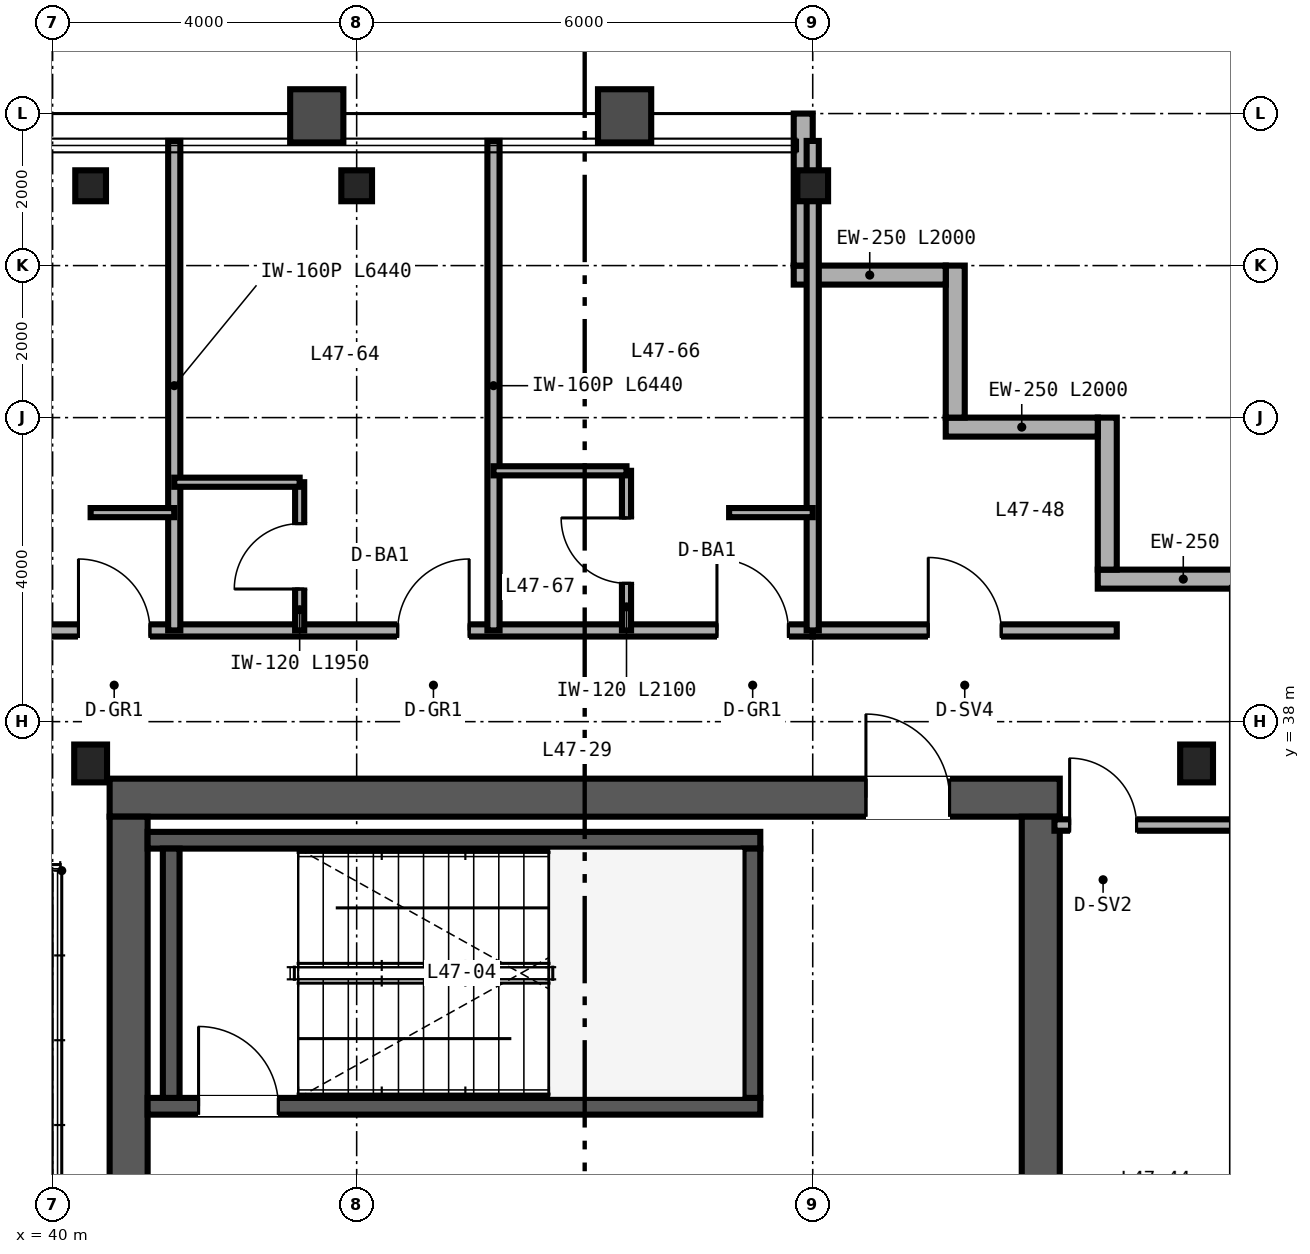
"""IFC4 building model, lengths in metres.
Left out: names, types, materials, properties, quantities, classifications, styles, units other than length and angle.
Written with IfcOpenShell. Run it as: python <this file> out.ifc"""

import sys

from ifc_helpers import new_model, si_unit, direction, frame, frame_2d, origin, origin_2d, place, context, subcontext, project, spatial, rectangle, i_section, extrude, source, transform, mapped, element, fill, save


model = new_model("IFC4")
c1 = context("Model", 3, precision=1e-05, world=origin(), true_north=direction((0.0, 1.0)))
c2 = subcontext(c1, "Body", "Model", "MODEL_VIEW")
j1 = project(units=[si_unit("LENGTHUNIT", "METRE"), si_unit("PLANEANGLEUNIT", "RADIAN")], contexts=[c1])
p1 = place(None, origin())
s1 = spatial("IfcSite", under=j1, at=p1, CompositionType="ELEMENT")
p2 = place(p1, origin())
s2 = spatial("IfcBuilding", under=s1, at=p2, CompositionType="ELEMENT")
p3 = place(p2, frame((0.0, 0.0, 188.4)))
s3 = spatial("IfcBuildingStorey", under=s2, at=p3, CompositionType="ELEMENT", Elevation=188.4)
p4 = place(p3, frame((40.75, 37.0, 0.0), z_axis=(0.0, 0.0, 1.0), x_axis=(1.0, 0.0, 0.0)))
e1 = element("IfcWall", 1, at=p4, inside=s3, PredefinedType="SHEAR", context=c2, shape_type="SweptSolid", body=[
    extrude(rectangle(XDim=12.5, YDim=0.5, at=frame_2d((6.25, 0.0))), origin(), (0.0, 0.0, 1.0), 3.37),
])
p5 = place(p4, frame((9.95, 0.0, 0.0)))
e2 = element("IfcOpeningElement", 2, at=p5, cuts=e1, PredefinedType="OPENING", context=c2, shape_type="SweptSolid", body=[
    extrude(rectangle(XDim=1.1, YDim=2.15, at=frame_2d((0.55, 1.075))), frame((0.0, 0.26, 0.0), z_axis=(0.0, -1.0, 0.0), x_axis=(1.0, 0.0, 0.0)), (0.0, 0.0, 1.0), 0.52),
])
for number, where, z_axis, x_axis in (
    (3, (41.0, 15.25, 0.0), (0.0, 0.0, 1.0), (0.0, 1.0, 0.0)),
    (4, (53.0, 15.25, 0.0), (0.0, 0.0, 1.0), (0.0, 1.0, 0.0)),
):
    element("IfcWall", number, at=place(p3, frame(where, z_axis=z_axis, x_axis=x_axis)), inside=s3, PredefinedType="SHEAR", context=c2, shape_type="SweptSolid", body=[
        extrude(rectangle(XDim=21.5, YDim=0.5, at=frame_2d((10.75, 0.0))), origin(), (0.0, 0.0, 1.0), 3.37),
    ])
p6 = place(p3, frame((41.25, 32.94, 0.0), z_axis=(0.0, 0.0, 1.0), x_axis=(1.0, 0.0, 0.0)))
e5 = element("IfcWall", 5, at=p6, inside=s3, PredefinedType="SHEAR", context=c2, shape_type="SweptSolid", body=[
    extrude(rectangle(XDim=8.06, YDim=0.22, at=frame_2d((4.03, 0.0))), origin(), (0.0, 0.0, 1.0), 3.4),
])
p7 = place(p6, frame((0.67, 0.0, 0.0)))
e6 = element("IfcOpeningElement", 6, at=p7, cuts=e5, PredefinedType="OPENING", context=c2, shape_type="SweptSolid", body=[
    extrude(rectangle(XDim=1.05, YDim=2.15, at=frame_2d((0.525, 1.075))), frame((0.0, 0.12, 0.0), z_axis=(0.0, -1.0, 0.0), x_axis=(1.0, 0.0, 0.0)), (0.0, 0.0, 1.0), 0.24),
])
p8 = place(p3, frame((41.25, 36.44, 0.0), z_axis=(0.0, 0.0, 1.0), x_axis=(1.0, 0.0, 0.0)))
e7 = element("IfcWall", 7, at=p8, inside=s3, PredefinedType="SHEAR", context=c2, shape_type="SweptSolid", body=[
    extrude(rectangle(XDim=8.06, YDim=0.22, at=frame_2d((4.03, 0.0))), origin(), (0.0, 0.0, 1.0), 3.4),
])
for number, where, z_axis, x_axis in (
    (8, (41.56, 33.05, 0.0), (0.0, 0.0, 1.0), (0.0, 1.0, 0.0)),
    (9, (49.2, 33.05, 0.0), (0.0, 0.0, 1.0), (0.0, 1.0, 0.0)),
):
    element("IfcWall", number, at=place(p3, frame(where, z_axis=z_axis, x_axis=x_axis)), inside=s3, PredefinedType="SHEAR", context=c2, shape_type="SweptSolid", body=[
        extrude(rectangle(XDim=3.28, YDim=0.22, at=frame_2d((1.64, 0.0))), origin(), (0.0, 0.0, 1.0), 3.4),
    ])
m1 = source(origin(), c2, "Body", "SweptSolid", [
    extrude(i_section(OverallWidth=0.432, OverallDepth=0.498, WebThickness=0.056, FlangeThickness=0.089, FilletRadius=0.025, at=origin_2d()), origin(), (0.0, 0.0, 1.0), 3.37),
])
for number, where, z_axis, x_axis in (
    (10, (40.5, 37.45, 0.0), (0.0, 0.0, 1.0), (1.0, 0.0, 0.0)),
    (11, (55.05, 37.45, 0.0), (0.0, 0.0, 1.0), (1.0, 0.0, 0.0)),
):
    element("IfcColumn", number, at=place(p3, frame(where, z_axis=z_axis, x_axis=x_axis)), inside=s3, PredefinedType="COLUMN", context=c2, shape_type="MappedRepresentation", body=[
        mapped(m1, transform((0.0, 0.0, 0.0), scale=1.0)),
    ])
m2 = source(origin(), c2, "Body", "SweptSolid", [
    extrude(i_section(OverallWidth=0.404, OverallDepth=0.407, WebThickness=0.027, FlangeThickness=0.044, FilletRadius=0.025, at=origin_2d()), origin(), (0.0, 0.0, 1.0), 3.37),
])
for number, where, z_axis, x_axis in (
    (12, (40.5, 45.05, 0.0), (0.0, 0.0, 1.0), (1.0, 0.0, 0.0)),
    (13, (44.0, 45.05, 0.0), (0.0, 0.0, 1.0), (1.0, 0.0, 0.0)),
    (14, (50.0, 45.05, 0.0), (0.0, 0.0, 1.0), (1.0, 0.0, 0.0)),
):
    element("IfcColumn", number, at=place(p3, frame(where, z_axis=z_axis, x_axis=x_axis)), inside=s3, PredefinedType="COLUMN", context=c2, shape_type="MappedRepresentation", body=[
        mapped(m2, transform((0.0, 0.0, 0.0), scale=1.0)),
    ])
p9 = place(p3, frame((56.0, 39.875, 0.0), z_axis=(0.0, 0.0, 1.0), x_axis=(-1.0, 0.0, 0.0)))
e15 = element("IfcWall", 15, at=p9, inside=s3, PredefinedType="SOLIDWALL", context=c2, shape_type="SweptSolid", body=[
    extrude(rectangle(XDim=2.25, YDim=0.25, at=frame_2d((1.125, 0.0))), origin(), (0.0, 0.0, 1.0), 3.37),
])
for number, where, z_axis, x_axis in (
    (16, (53.875, 40.0, 0.0), (0.0, 0.0, 1.0), (0.0, 1.0, 0.0)),
    (17, (53.75, 41.875, 0.0), (0.0, 0.0, 1.0), (-1.0, 0.0, 0.0)),
    (18, (51.875, 42.0, 0.0), (0.0, 0.0, 1.0), (0.0, 1.0, 0.0)),
    (19, (51.75, 43.875, 0.0), (0.0, 0.0, 1.0), (-1.0, 0.0, 0.0)),
):
    element("IfcWall", number, at=place(p3, frame(where, z_axis=z_axis, x_axis=x_axis)), inside=s3, PredefinedType="SOLIDWALL", context=c2, shape_type="SweptSolid", body=[
        extrude(rectangle(XDim=2.0, YDim=0.25, at=frame_2d((1.0, 0.0))), origin(), (0.0, 0.0, 1.0), 3.37),
    ])
p10 = place(p3, frame((49.875, 44.0, 0.0), z_axis=(0.0, 0.0, 1.0), x_axis=(0.0, 1.0, 0.0)))
e20 = element("IfcWall", 20, at=p10, inside=s3, PredefinedType="SOLIDWALL", context=c2, shape_type="SweptSolid", body=[
    extrude(rectangle(XDim=2.0, YDim=0.25, at=frame_2d((1.0, 0.0))), origin(), (0.0, 0.0, 1.0), 2.677),
])
p11 = place(p3, frame((53.18, 36.64, 0.0), z_axis=(0.0, 0.0, 1.0), x_axis=(1.0, 0.0, 0.0)))
e21 = element("IfcWall", 21, at=p11, inside=s3, PredefinedType="PARTITIONING", context=c2, shape_type="SweptSolid", body=[
    extrude(rectangle(XDim=2.66, YDim=0.15, at=frame_2d((1.33, 0.0))), origin(), (0.0, 0.0, 1.0), 2.753),
])
p12 = place(p11, frame((0.2, 0.0, 0.0)))
e22 = element("IfcOpeningElement", 22, at=p12, cuts=e21, PredefinedType="OPENING", context=c2, shape_type="SweptSolid", body=[
    extrude(rectangle(XDim=0.88, YDim=2.15, at=frame_2d((0.44, 1.075))), frame((0.0, 0.085, 0.0), z_axis=(0.0, -1.0, 0.0), x_axis=(1.0, 0.0, 0.0)), (0.0, 0.0, 1.0), 0.17),
])
p13 = place(p3, frame((50.0, 39.2, 0.0), z_axis=(0.0, 0.0, 1.0), x_axis=(1.0, 0.0, 0.0)))
e23 = element("IfcWall", 23, at=p13, inside=s3, PredefinedType="PARTITIONING", context=c2, shape_type="SweptSolid", body=[
    extrude(rectangle(XDim=4.0, YDim=0.16, at=frame_2d((2.0, 0.0))), origin(), (0.0, 0.0, 1.0), 3.37),
])
p14 = place(p13, frame((1.52, 0.0, 0.0)))
e24 = element("IfcOpeningElement", 24, at=p14, cuts=e23, PredefinedType="OPENING", context=c2, shape_type="SweptSolid", body=[
    extrude(rectangle(XDim=0.96, YDim=2.15, at=frame_2d((0.48, 1.075))), frame((0.0, 0.09, 0.0), z_axis=(0.0, -1.0, 0.0), x_axis=(1.0, 0.0, 0.0)), (0.0, 0.0, 1.0), 0.18),
])
p15 = place(p3, frame((14.0, 39.2, 0.0), z_axis=(0.0, 0.0, 1.0), x_axis=(1.0, 0.0, 0.0)))
e25 = element("IfcWall", 25, at=p15, inside=s3, PredefinedType="PARTITIONING", context=c2, shape_type="SweptSolid", body=[
    extrude(rectangle(XDim=36.0, YDim=0.16, at=frame_2d((18.0, 0.0))), origin(), (0.0, 0.0, 1.0), 2.913),
])
p16 = place(p15, frame((3.94, 0.0, 0.0)))
e26 = element("IfcOpeningElement", 26, at=p16, cuts=e25, PredefinedType="OPENING", context=c2, shape_type="SweptSolid", body=[
    extrude(rectangle(XDim=0.94, YDim=2.15, at=frame_2d((0.47, 1.075))), frame((0.0, 0.09, 0.0), z_axis=(0.0, -1.0, 0.0), x_axis=(1.0, 0.0, 0.0)), (0.0, 0.0, 1.0), 0.18),
])
p17 = place(p15, frame((9.14, 0.0, 0.0)))
e27 = element("IfcOpeningElement", 27, at=p17, cuts=e25, PredefinedType="OPENING", context=c2, shape_type="SweptSolid", body=[
    extrude(rectangle(XDim=0.94, YDim=2.15, at=frame_2d((0.47, 1.075))), frame((0.0, 0.09, 0.0), z_axis=(0.0, -1.0, 0.0), x_axis=(1.0, 0.0, 0.0)), (0.0, 0.0, 1.0), 0.18),
])
p18 = place(p15, frame((12.72, 0.0, 0.0)))
e28 = element("IfcOpeningElement", 28, at=p18, cuts=e25, PredefinedType="OPENING", context=c2, shape_type="SweptSolid", body=[
    extrude(rectangle(XDim=0.96, YDim=2.15, at=frame_2d((0.48, 1.075))), frame((0.0, 0.09, 0.0), z_axis=(0.0, -1.0, 0.0), x_axis=(1.0, 0.0, 0.0)), (0.0, 0.0, 1.0), 0.18),
])
p19 = place(p15, frame((18.42, 0.0, 0.0)))
e29 = element("IfcOpeningElement", 29, at=p19, cuts=e25, PredefinedType="OPENING", context=c2, shape_type="SweptSolid", body=[
    extrude(rectangle(XDim=0.96, YDim=2.15, at=frame_2d((0.48, 1.075))), frame((0.0, 0.09, 0.0), z_axis=(0.0, -1.0, 0.0), x_axis=(1.0, 0.0, 0.0)), (0.0, 0.0, 1.0), 0.18),
])
p20 = place(p15, frame((26.34, 0.0, 0.0)))
e30 = element("IfcOpeningElement", 30, at=p20, cuts=e25, PredefinedType="OPENING", context=c2, shape_type="SweptSolid", body=[
    extrude(rectangle(XDim=0.94, YDim=2.15, at=frame_2d((0.47, 1.075))), frame((0.0, 0.09, 0.0), z_axis=(0.0, -1.0, 0.0), x_axis=(1.0, 0.0, 0.0)), (0.0, 0.0, 1.0), 0.18),
])
p21 = place(p15, frame((30.54, 0.0, 0.0)))
e31 = element("IfcOpeningElement", 31, at=p21, cuts=e25, PredefinedType="OPENING", context=c2, shape_type="SweptSolid", body=[
    extrude(rectangle(XDim=0.94, YDim=2.15, at=frame_2d((0.47, 1.075))), frame((0.0, 0.09, 0.0), z_axis=(0.0, -1.0, 0.0), x_axis=(1.0, 0.0, 0.0)), (0.0, 0.0, 1.0), 0.18),
])
p22 = place(p15, frame((34.74, 0.0, 0.0)))
e32 = element("IfcOpeningElement", 32, at=p22, cuts=e25, PredefinedType="OPENING", context=c2, shape_type="SweptSolid", body=[
    extrude(rectangle(XDim=0.94, YDim=2.15, at=frame_2d((0.47, 1.075))), frame((0.0, 0.09, 0.0), z_axis=(0.0, -1.0, 0.0), x_axis=(1.0, 0.0, 0.0)), (0.0, 0.0, 1.0), 0.18),
])
p23 = place(p3, frame((50.0, 39.2, 0.0), z_axis=(0.0, 0.0, 1.0), x_axis=(0.0, 1.0, 0.0)))
e33 = element("IfcWall", 33, at=p23, inside=s3, PredefinedType="PARTITIONING", context=c2, shape_type="SweptSolid", body=[
    extrude(rectangle(XDim=6.44, YDim=0.16, at=frame_2d((3.22, 0.0))), origin(), (0.0, 0.0, 1.0), 2.677),
])
p24 = place(p3, frame((41.6, 39.2, 0.0), z_axis=(0.0, 0.0, 1.0), x_axis=(0.0, 1.0, 0.0)))
e34 = element("IfcWall", 34, at=p24, inside=s3, PredefinedType="PARTITIONING", context=c2, shape_type="SweptSolid", body=[
    extrude(rectangle(XDim=6.44, YDim=0.16, at=frame_2d((3.22, 0.0))), origin(), (0.0, 0.0, 1.0), 2.833),
])
p25 = place(p3, frame((40.5, 40.75, 0.0), z_axis=(0.0, 0.0, 1.0), x_axis=(1.0, 0.0, 0.0)))
e35 = element("IfcWall", 35, at=p25, inside=s3, PredefinedType="PARTITIONING", context=c2, shape_type="SweptSolid", body=[
    extrude(rectangle(XDim=1.1, YDim=0.12, at=frame_2d((0.55, 0.0))), origin(), (0.0, 0.0, 1.0), 2.913),
])
p26 = place(p3, frame((45.8, 39.2, 0.0), z_axis=(0.0, 0.0, 1.0), x_axis=(0.0, 1.0, 0.0)))
e36 = element("IfcWall", 36, at=p26, inside=s3, PredefinedType="PARTITIONING", context=c2, shape_type="SweptSolid", body=[
    extrude(rectangle(XDim=6.44, YDim=0.16, at=frame_2d((3.22, 0.0))), origin(), (0.0, 0.0, 1.0), 2.677),
])
p27 = place(p3, frame((43.25, 39.2, 0.0), z_axis=(0.0, 0.0, 1.0), x_axis=(0.0, 1.0, 0.0)))
e37 = element("IfcWall", 37, at=p27, inside=s3, PredefinedType="PARTITIONING", context=c2, shape_type="SweptSolid", body=[
    extrude(rectangle(XDim=1.95, YDim=0.12, at=frame_2d((0.975, 0.0))), origin(), (0.0, 0.0, 1.0), 3.37),
])
p28 = place(p27, frame((0.545, 0.0, 0.0)))
e38 = element("IfcOpeningElement", 38, at=p28, cuts=e37, PredefinedType="OPENING", context=c2, shape_type="SweptSolid", body=[
    extrude(rectangle(XDim=0.86, YDim=2.1, at=frame_2d((0.43, 1.05))), frame((0.0, 0.07, 0.0), z_axis=(0.0, -1.0, 0.0), x_axis=(1.0, 0.0, 0.0)), (0.0, 0.0, 1.0), 0.14),
])
p29 = place(p3, frame((41.6, 41.15, 0.0), z_axis=(0.0, 0.0, 1.0), x_axis=(1.0, 0.0, 0.0)))
e39 = element("IfcWall", 39, at=p29, inside=s3, PredefinedType="PARTITIONING", context=c2, shape_type="SweptSolid", body=[
    extrude(rectangle(XDim=1.65, YDim=0.12, at=frame_2d((0.825, 0.0))), origin(), (0.0, 0.0, 1.0), 3.37),
])
p30 = place(p3, frame((47.55, 39.2, 0.0), z_axis=(0.0, 0.0, 1.0), x_axis=(0.0, 1.0, 0.0)))
e40 = element("IfcWall", 40, at=p30, inside=s3, PredefinedType="PARTITIONING", context=c2, shape_type="SweptSolid", body=[
    extrude(rectangle(XDim=2.1, YDim=0.12, at=frame_2d((1.05, 0.0))), origin(), (0.0, 0.0, 1.0), 3.37),
])
p31 = place(p30, frame((0.62, 0.0, 0.0)))
e41 = element("IfcOpeningElement", 41, at=p31, cuts=e40, PredefinedType="OPENING", context=c2, shape_type="SweptSolid", body=[
    extrude(rectangle(XDim=0.86, YDim=2.1, at=frame_2d((0.43, 1.05))), frame((0.0, 0.07, 0.0), z_axis=(0.0, -1.0, 0.0), x_axis=(1.0, 0.0, 0.0)), (0.0, 0.0, 1.0), 0.14),
])
p32 = place(p3, frame((45.8, 41.3, 0.0), z_axis=(0.0, 0.0, 1.0), x_axis=(1.0, 0.0, 0.0)))
e42 = element("IfcWall", 42, at=p32, inside=s3, PredefinedType="PARTITIONING", context=c2, shape_type="SweptSolid", body=[
    extrude(rectangle(XDim=1.75, YDim=0.12, at=frame_2d((0.875, 0.0))), origin(), (0.0, 0.0, 1.0), 3.37),
])
p33 = place(p3, frame((48.9, 40.75, 0.0), z_axis=(0.0, 0.0, 1.0), x_axis=(1.0, 0.0, 0.0)))
e43 = element("IfcWall", 43, at=p33, inside=s3, PredefinedType="PARTITIONING", context=c2, shape_type="SweptSolid", body=[
    extrude(rectangle(XDim=1.1, YDim=0.12, at=frame_2d((0.55, 0.0))), origin(), (0.0, 0.0, 1.0), 3.37),
])
m3 = source(origin(), c2, "Body", "SweptSolid", [
    extrude(rectangle(XDim=1.05, YDim=2.15, at=frame_2d((0.525, 1.075))), frame((0.0, 0.025, 0.0), z_axis=(0.0, -1.0, 0.0), x_axis=(1.0, 0.0, 0.0)), (0.0, 0.0, 1.0), 0.05),
])
p34 = place(p7, origin())
e44 = element("IfcDoor", 44, at=p34, inside=s3, OperationType="SINGLE_SWING_LEFT", PredefinedType="DOOR", context=c2, shape_type="MappedRepresentation", body=[
    mapped(m3, transform((0.0, 0.0, 0.0), scale=1.0)),
])
fill(e6, e44)
m4 = source(origin(), c2, "Body", "SweptSolid", [
    extrude(rectangle(XDim=1.1, YDim=2.15, at=frame_2d((0.55, 1.075))), frame((0.0, 0.025, 0.0), z_axis=(0.0, -1.0, 0.0), x_axis=(1.0, 0.0, 0.0)), (0.0, 0.0, 1.0), 0.05),
])
p35 = place(p5, origin())
e45 = element("IfcDoor", 45, at=p35, inside=s3, OperationType="SINGLE_SWING_LEFT", PredefinedType="DOOR", context=c2, shape_type="MappedRepresentation", body=[
    mapped(m4, transform((0.0, 0.0, 0.0), scale=1.0)),
])
fill(e2, e45)
m5 = source(origin(), c2, "Body", "SweptSolid", [
    extrude(rectangle(XDim=0.88, YDim=2.15, at=frame_2d((0.44, 1.075))), frame((0.0, 0.025, 0.0), z_axis=(0.0, -1.0, 0.0), x_axis=(1.0, 0.0, 0.0)), (0.0, 0.0, 1.0), 0.05),
])
p36 = place(p12, origin())
e46 = element("IfcDoor", 46, at=p36, inside=s3, OperationType="SINGLE_SWING_LEFT", PredefinedType="DOOR", context=c2, shape_type="MappedRepresentation", body=[
    mapped(m5, transform((0.0, 0.0, 0.0), scale=1.0)),
])
fill(e22, e46)
m6 = source(origin(), c2, "Body", "SweptSolid", [
    extrude(rectangle(XDim=0.96, YDim=2.15, at=frame_2d((0.48, 1.075))), frame((0.0, 0.025, 0.0), z_axis=(0.0, -1.0, 0.0), x_axis=(1.0, 0.0, 0.0)), (0.0, 0.0, 1.0), 0.05),
])
p37 = place(p14, origin())
e47 = element("IfcDoor", 47, at=p37, inside=s3, OperationType="SINGLE_SWING_LEFT", PredefinedType="DOOR", context=c2, shape_type="MappedRepresentation", body=[
    mapped(m6, transform((0.0, 0.0, 0.0), scale=1.0)),
])
fill(e24, e47)
m7 = source(origin(), c2, "Body", "SweptSolid", [
    extrude(rectangle(XDim=0.86, YDim=2.1, at=frame_2d((0.43, 1.05))), frame((0.0, 0.025, 0.0), z_axis=(0.0, -1.0, 0.0), x_axis=(1.0, 0.0, 0.0)), (0.0, 0.0, 1.0), 0.05),
])
p38 = place(p28, origin())
e48 = element("IfcDoor", 48, at=p38, inside=s3, OperationType="SINGLE_SWING_LEFT", PredefinedType="DOOR", context=c2, shape_type="MappedRepresentation", body=[
    mapped(m7, transform((0.0, 0.0, 0.0), scale=1.0)),
])
fill(e38, e48)
p39 = place(p31, origin())
e49 = element("IfcDoor", 49, at=p39, inside=s3, OperationType="SINGLE_SWING_RIGHT", PredefinedType="DOOR", context=c2, shape_type="MappedRepresentation", body=[
    mapped(m7, transform((0.0, 0.0, 0.0), scale=1.0)),
])
fill(e41, e49)
m8 = source(origin(), c2, "Body", "SweptSolid", [
    extrude(rectangle(XDim=0.94, YDim=2.15, at=frame_2d((0.47, 1.075))), frame((0.0, 0.025, 0.0), z_axis=(0.0, -1.0, 0.0), x_axis=(1.0, 0.0, 0.0)), (0.0, 0.0, 1.0), 0.05),
])
p40 = place(p20, origin())
e50 = element("IfcDoor", 50, at=p40, inside=s3, OperationType="SINGLE_SWING_LEFT", PredefinedType="DOOR", context=c2, shape_type="MappedRepresentation", body=[
    mapped(m8, transform((0.0, 0.0, 0.0), scale=1.0)),
])
fill(e30, e50)
p41 = place(p21, origin())
e51 = element("IfcDoor", 51, at=p41, inside=s3, OperationType="SINGLE_SWING_RIGHT", PredefinedType="DOOR", context=c2, shape_type="MappedRepresentation", body=[
    mapped(m8, transform((0.0, 0.0, 0.0), scale=1.0)),
])
fill(e31, e51)
p42 = place(p22, origin())
e52 = element("IfcDoor", 52, at=p42, inside=s3, OperationType="SINGLE_SWING_LEFT", PredefinedType="DOOR", context=c2, shape_type="MappedRepresentation", body=[
    mapped(m8, transform((0.0, 0.0, 0.0), scale=1.0)),
])
fill(e32, e52)
save(model, sys.argv[1])
